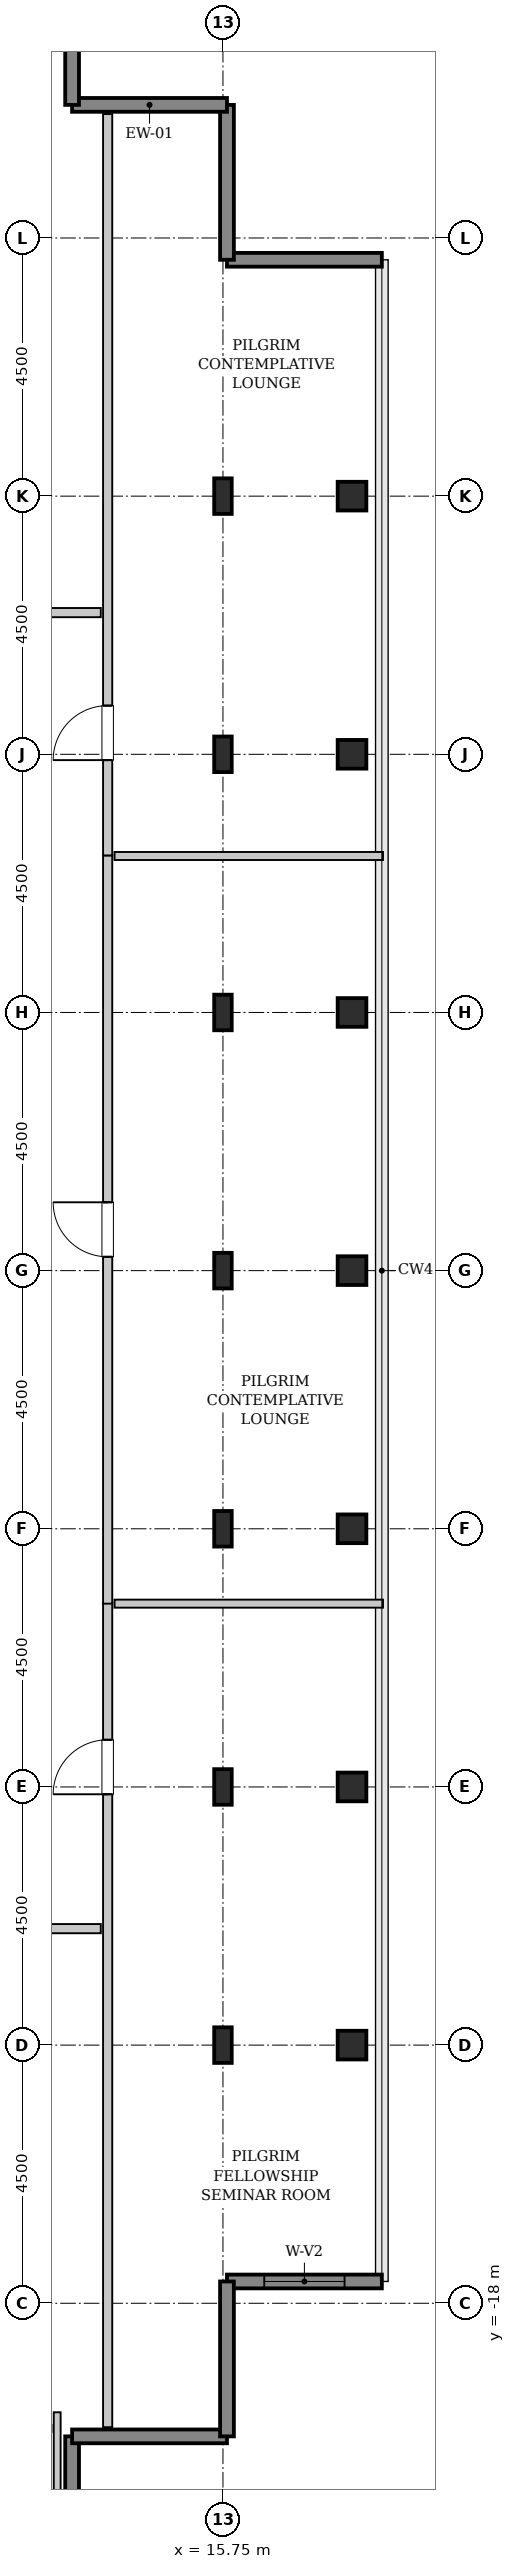
"""IFC4 building model, lengths in metres.
Left out: names, types, materials, properties, quantities, classifications, styles, units other than length and angle.
Written with IfcOpenShell. Run it as: python <this file> out.ifc"""

import sys

from ifc_helpers import new_model, si_unit, direction, frame, frame_2d, origin, origin_2d, place, context, subcontext, project, spatial, rectangle, hollow_rectangle, i_section, extrude, source, transform, mapped, element, fill, save


model = new_model("IFC4")
c1 = context("Model", 3, precision=1e-05, world=origin(), true_north=direction((0.0, 1.0)))
c2 = subcontext(c1, "Body", "Model", "MODEL_VIEW")
j1 = project(units=[si_unit("LENGTHUNIT", "METRE"), si_unit("PLANEANGLEUNIT", "RADIAN")], contexts=[c1])
p1 = place(None, origin())
s1 = spatial("IfcSite", under=j1, at=p1, CompositionType="ELEMENT")
p2 = place(p1, origin())
s2 = spatial("IfcBuilding", under=s1, at=p2, CompositionType="ELEMENT")
p3 = place(p2, frame((0.0, 0.0, 306.4)))
s3 = spatial("IfcBuildingStorey", under=s2, at=p3, CompositionType="ELEMENT", Elevation=306.4)
m1 = source(origin(), c2, "Body", "SweptSolid", [
    extrude(i_section(OverallWidth=0.305, OverallDepth=0.62, WebThickness=0.021, FlangeThickness=0.04, FilletRadius=0.027, at=origin_2d()), origin(), (0.0, 0.0, 1.0), 3.8),
])
for number, where, z_axis, x_axis in (
    (1, (15.75, -13.5, 0.0), (0.0, 0.0, 1.0), (1.0, 0.0, 0.0)),
    (2, (15.75, -9.0, 0.0), (0.0, 0.0, 1.0), (1.0, 0.0, 0.0)),
    (3, (15.75, -4.5, 0.0), (0.0, 0.0, 1.0), (1.0, 0.0, 0.0)),
    (4, (15.75, 0.0, 0.0), (0.0, 0.0, 1.0), (1.0, 0.0, 0.0)),
    (5, (15.75, 4.5, 0.0), (0.0, 0.0, 1.0), (1.0, 0.0, 0.0)),
    (6, (15.75, 9.0, 0.0), (0.0, 0.0, 1.0), (1.0, 0.0, 0.0)),
    (7, (15.75, 13.5, 0.0), (0.0, 0.0, 1.0), (1.0, 0.0, 0.0)),
):
    element("IfcColumn", number, at=place(p3, frame(where, z_axis=z_axis, x_axis=x_axis)), inside=s3, PredefinedType="COLUMN", context=c2, shape_type="MappedRepresentation", body=[
        mapped(m1, transform((0.0, 0.0, 0.0), x_axis=(1.0, 0.0, 0.0), y_axis=(0.0, 1.0, 0.0), z_axis=(0.0, 0.0, 1.0), scale=1.0)),
    ])
m2 = source(origin(), c2, "Body", "SweptSolid", [
    extrude(hollow_rectangle(XDim=0.5, YDim=0.5, WallThickness=0.025, InnerFilletRadius=0.025, OuterFilletRadius=0.05, at=origin_2d()), origin(), (0.0, 0.0, 1.0), 3.8),
])
for number, where, z_axis, x_axis in (
    (8, (18.0, -13.5, 0.0), (0.0, 0.0, 1.0), (1.0, 0.0, 0.0)),
    (9, (18.0, -9.0, 0.0), (0.0, 0.0, 1.0), (1.0, 0.0, 0.0)),
    (10, (18.0, -4.5, 0.0), (0.0, 0.0, 1.0), (1.0, 0.0, 0.0)),
    (11, (18.0, 0.0, 0.0), (0.0, 0.0, 1.0), (1.0, 0.0, 0.0)),
    (12, (18.0, 4.5, 0.0), (0.0, 0.0, 1.0), (1.0, 0.0, 0.0)),
    (13, (18.0, 9.0, 0.0), (0.0, 0.0, 1.0), (1.0, 0.0, 0.0)),
    (14, (18.0, 13.5, 0.0), (0.0, 0.0, 1.0), (1.0, 0.0, 0.0)),
):
    element("IfcColumn", number, at=place(p3, frame(where, z_axis=z_axis, x_axis=x_axis)), inside=s3, PredefinedType="COLUMN", context=c2, shape_type="MappedRepresentation", body=[
        mapped(m2, transform((0.0, 0.0, 0.0), x_axis=(1.0, 0.0, 0.0), y_axis=(0.0, 1.0, 0.0), z_axis=(0.0, 0.0, 1.0), scale=1.0)),
    ])
m3 = source(origin(), c2, "Body", "SweptSolid", [
    extrude(rectangle(XDim=2.7, YDim=0.24, at=frame_2d((1.35, 0.0))), origin(), (0.0, 0.0, 1.0), 3.55),
])
p4 = place(p3, frame((15.82, -17.62, 0.0), z_axis=(0.0, 0.0, 1.0), x_axis=(1.0, 0.0, 0.0)))
e15 = element("IfcWall", 15, at=p4, inside=s3, PredefinedType="SHEAR", context=c2, shape_type="MappedRepresentation", body=[
    mapped(m3, transform((0.0, 0.0, 0.0), x_axis=(1.0, 0.0, 0.0), y_axis=(0.0, 1.0, 0.0), z_axis=(0.0, 0.0, 1.0), scale=1.0)),
])
p5 = place(p4, frame((0.65, 0.0, 0.85)))
e16 = element("IfcOpeningElement", 16, at=p5, cuts=e15, PredefinedType="OPENING", context=c2, shape_type="SweptSolid", body=[
    extrude(rectangle(XDim=1.4, YDim=1.8, at=frame_2d((0.7, 0.9))), frame((0.0, 0.13, 0.0), z_axis=(0.0, -1.0, 0.0), x_axis=(1.0, 0.0, 0.0)), (0.0, 0.0, 1.0), 0.26),
])
for number, where, z_axis, x_axis in (
    (17, (18.52, 17.62, 0.0), (0.0, 0.0, 1.0), (-1.0, 0.0, 0.0)),
    (18, (15.82, 17.62, 0.0), (0.0, 0.0, 1.0), (0.0, 1.0, 0.0)),
    (19, (15.82, 20.32, 0.0), (0.0, 0.0, 1.0), (-1.0, 0.0, 0.0)),
    (20, (13.12, 20.32, 0.0), (0.0, 0.0, 1.0), (0.0, 1.0, 0.0)),
    (21, (13.12, -23.02, 0.0), (0.0, 0.0, 1.0), (0.0, 1.0, 0.0)),
    (22, (13.12, -20.32, 0.0), (0.0, 0.0, 1.0), (1.0, 0.0, 0.0)),
    (23, (15.82, -20.32, 0.0), (0.0, 0.0, 1.0), (0.0, 1.0, 0.0)),
):
    element("IfcWall", number, at=place(p3, frame(where, z_axis=z_axis, x_axis=x_axis)), inside=s3, PredefinedType="SHEAR", context=c2, shape_type="MappedRepresentation", body=[
        mapped(m3, transform((0.0, 0.0, 0.0), x_axis=(1.0, 0.0, 0.0), y_axis=(0.0, 1.0, 0.0), z_axis=(0.0, 0.0, 1.0), scale=1.0)),
    ])
m4 = source(origin(), c2, "Body", "SweptSolid", [
    extrude(rectangle(XDim=2.76, YDim=0.12, at=frame_2d((1.38, 0.0))), origin(), (0.0, 0.0, 1.0), 3.535),
])
p6 = place(p3, frame((12.86, -22.66, 0.0), z_axis=(0.0, 0.0, 1.0), x_axis=(0.0, 1.0, 0.0)))
e24 = element("IfcWall", 24, at=p6, inside=s3, PredefinedType="PLUMBINGWALL", context=c2, shape_type="MappedRepresentation", body=[
    mapped(m4, transform((0.0, 0.0, 0.0), x_axis=(1.0, 0.0, 0.0), y_axis=(0.0, 1.0, 0.0), z_axis=(0.0, 0.0, 1.0), scale=1.0)),
])
m5 = source(origin(), c2, "Body", "SweptSolid", [
    extrude(rectangle(XDim=14.365, YDim=0.16, at=frame_2d((7.183, 0.0))), origin(), (0.0, 0.0, 1.0), 3.535),
])
p7 = place(p3, frame((13.74, -20.16, 0.0), z_axis=(0.0, 0.0, 1.0), x_axis=(0.0, 1.0, 0.0)))
e25 = element("IfcWall", 25, at=p7, inside=s3, PredefinedType="PARTITIONING", context=c2, shape_type="MappedRepresentation", body=[
    mapped(m5, transform((0.0, 0.0, 0.0), x_axis=(1.0, 0.0, 0.0), y_axis=(0.0, 1.0, 0.0), z_axis=(0.0, 0.0, 1.0), scale=1.0)),
])
p8 = place(p7, frame((11.032, 0.0, 0.0)))
e26 = element("IfcOpeningElement", 26, at=p8, cuts=e25, PredefinedType="OPENING", context=c2, shape_type="SweptSolid", body=[
    extrude(rectangle(XDim=0.95, YDim=2.1, at=frame_2d((0.475, 1.05))), frame((0.0, 0.09, 0.0), z_axis=(0.0, -1.0, 0.0), x_axis=(1.0, 0.0, 0.0)), (0.0, 0.0, 1.0), 0.18),
])
m6 = source(origin(), c2, "Body", "SweptSolid", [
    extrude(rectangle(XDim=4.68, YDim=0.14, at=frame_2d((2.34, 0.0))), origin(), (0.0, 0.0, 1.0), 3.535),
])
p9 = place(p3, frame((13.86, -5.805, 0.0), z_axis=(0.0, 0.0, 1.0), x_axis=(1.0, 0.0, 0.0)))
e27 = element("IfcWall", 27, at=p9, inside=s3, PredefinedType="PARTITIONING", context=c2, shape_type="MappedRepresentation", body=[
    mapped(m6, transform((0.0, 0.0, 0.0), x_axis=(1.0, 0.0, 0.0), y_axis=(0.0, 1.0, 0.0), z_axis=(0.0, 0.0, 1.0), scale=1.0)),
])
m7 = source(origin(), c2, "Body", "SweptSolid", [
    extrude(rectangle(XDim=13.042, YDim=0.16, at=frame_2d((6.521, 0.0))), origin(), (0.0, 0.0, 1.0), 3.535),
])
p10 = place(p3, frame((13.74, -5.805, 0.0), z_axis=(0.0, 0.0, 1.0), x_axis=(0.0, 1.0, 0.0)))
e28 = element("IfcWall", 28, at=p10, inside=s3, PredefinedType="PARTITIONING", context=c2, shape_type="MappedRepresentation", body=[
    mapped(m7, transform((0.0, 0.0, 0.0), x_axis=(1.0, 0.0, 0.0), y_axis=(0.0, 1.0, 0.0), z_axis=(0.0, 0.0, 1.0), scale=1.0)),
])
p11 = place(p10, frame((6.046, 0.0, 0.0)))
e29 = element("IfcOpeningElement", 29, at=p11, cuts=e28, PredefinedType="OPENING", context=c2, shape_type="SweptSolid", body=[
    extrude(rectangle(XDim=0.95, YDim=2.1, at=frame_2d((0.475, 1.05))), frame((0.0, 0.09, 0.0), z_axis=(0.0, -1.0, 0.0), x_axis=(1.0, 0.0, 0.0)), (0.0, 0.0, 1.0), 0.18),
])
p12 = place(p3, frame((13.86, 7.228, 0.0), z_axis=(0.0, 0.0, 1.0), x_axis=(1.0, 0.0, 0.0)))
e30 = element("IfcWall", 30, at=p12, inside=s3, PredefinedType="PARTITIONING", context=c2, shape_type="MappedRepresentation", body=[
    mapped(m6, transform((0.0, 0.0, 0.0), x_axis=(1.0, 0.0, 0.0), y_axis=(0.0, 1.0, 0.0), z_axis=(0.0, 0.0, 1.0), scale=1.0)),
])
m8 = source(origin(), c2, "Body", "SweptSolid", [
    extrude(rectangle(XDim=12.922, YDim=0.16, at=frame_2d((6.461, 0.0))), origin(), (0.0, 0.0, 1.0), 3.535),
])
p13 = place(p3, frame((13.74, 7.238, 0.0), z_axis=(0.0, 0.0, 1.0), x_axis=(0.0, 1.0, 0.0)))
e31 = element("IfcWall", 31, at=p13, inside=s3, PredefinedType="PARTITIONING", context=c2, shape_type="MappedRepresentation", body=[
    mapped(m8, transform((0.0, 0.0, 0.0), x_axis=(1.0, 0.0, 0.0), y_axis=(0.0, 1.0, 0.0), z_axis=(0.0, 0.0, 1.0), scale=1.0)),
])
p14 = place(p13, frame((1.661, 0.0, 0.0)))
e32 = element("IfcOpeningElement", 32, at=p14, cuts=e31, PredefinedType="OPENING", context=c2, shape_type="SweptSolid", body=[
    extrude(rectangle(XDim=0.95, YDim=2.1, at=frame_2d((0.475, 1.05))), frame((0.0, 0.09, 0.0), z_axis=(0.0, -1.0, 0.0), x_axis=(1.0, 0.0, 0.0)), (0.0, 0.0, 1.0), 0.18),
])
m9 = source(origin(), c2, "Body", "SweptSolid", [
    extrude(rectangle(XDim=5.225, YDim=0.16, at=frame_2d((2.613, 0.0))), origin(), (0.0, 0.0, 1.0), 3.535),
])
p15 = place(p3, frame((8.395, 11.47, 0.0), z_axis=(0.0, 0.0, 1.0), x_axis=(1.0, 0.0, 0.0)))
e33 = element("IfcWall", 33, at=p15, inside=s3, PredefinedType="PARTITIONING", context=c2, shape_type="MappedRepresentation", body=[
    mapped(m9, transform((0.0, 0.0, 0.0), x_axis=(1.0, 0.0, 0.0), y_axis=(0.0, 1.0, 0.0), z_axis=(0.0, 0.0, 1.0), scale=1.0)),
])
p16 = place(p15, frame((2.137, 0.0, 0.0)))
e34 = element("IfcOpeningElement", 34, at=p16, cuts=e33, PredefinedType="OPENING", context=c2, shape_type="SweptSolid", body=[
    extrude(rectangle(XDim=0.95, YDim=2.1, at=frame_2d((0.475, 1.05))), frame((0.0, 0.09, 0.0), z_axis=(0.0, -1.0, 0.0), x_axis=(1.0, 0.0, 0.0)), (0.0, 0.0, 1.0), 0.18),
])
m10 = source(origin(), c2, "Body", "SweptSolid", [
    extrude(rectangle(XDim=3.56, YDim=0.16, at=frame_2d((1.78, 0.0))), origin(), (0.0, 0.0, 1.0), 3.535),
])
p17 = place(p3, frame((10.06, -11.47, 0.0), z_axis=(0.0, 0.0, 1.0), x_axis=(1.0, 0.0, 0.0)))
e35 = element("IfcWall", 35, at=p17, inside=s3, PredefinedType="PARTITIONING", context=c2, shape_type="MappedRepresentation", body=[
    mapped(m10, transform((0.0, 0.0, 0.0), x_axis=(1.0, 0.0, 0.0), y_axis=(0.0, 1.0, 0.0), z_axis=(0.0, 0.0, 1.0), scale=1.0)),
])
p18 = place(p17, frame((1.305, 0.0, 0.0)))
e36 = element("IfcOpeningElement", 36, at=p18, cuts=e35, PredefinedType="OPENING", context=c2, shape_type="SweptSolid", body=[
    extrude(rectangle(XDim=0.95, YDim=2.1, at=frame_2d((0.475, 1.05))), frame((0.0, 0.09, 0.0), z_axis=(0.0, -1.0, 0.0), x_axis=(1.0, 0.0, 0.0)), (0.0, 0.0, 1.0), 0.18),
])
m11 = source(origin(), c2, "Body", "SweptSolid", [
    extrude(rectangle(XDim=1.4, YDim=1.8, at=frame_2d((0.7, 0.9))), frame((0.0, 0.03, 0.0), z_axis=(0.0, -1.0, 0.0), x_axis=(1.0, 0.0, 0.0)), (0.0, 0.0, 1.0), 0.06),
])
p19 = place(p5, origin())
e37 = element("IfcWindow", 37, at=p19, inside=s3, PartitioningType="SINGLE_PANEL", PredefinedType="WINDOW", context=c2, shape_type="MappedRepresentation", body=[
    mapped(m11, transform((0.0, 0.0, 0.0), x_axis=(1.0, 0.0, 0.0), y_axis=(0.0, 1.0, 0.0), z_axis=(0.0, 0.0, 1.0), scale=1.0)),
])
fill(e16, e37)
m12 = source(origin(), c2, "Body", "SweptSolid", [
    extrude(rectangle(XDim=0.95, YDim=2.1, at=frame_2d((0.475, 1.05))), frame((0.0, 0.025, 0.0), z_axis=(0.0, -1.0, 0.0), x_axis=(1.0, 0.0, 0.0)), (0.0, 0.0, 1.0), 0.05),
])
p20 = place(p8, origin())
e38 = element("IfcDoor", 38, at=p20, inside=s3, OperationType="SINGLE_SWING_LEFT", PredefinedType="DOOR", context=c2, shape_type="MappedRepresentation", body=[
    mapped(m12, transform((0.0, 0.0, 0.0), x_axis=(1.0, 0.0, 0.0), y_axis=(0.0, 1.0, 0.0), z_axis=(0.0, 0.0, 1.0), scale=1.0)),
])
fill(e26, e38)
p21 = place(p11, origin())
e39 = element("IfcDoor", 39, at=p21, inside=s3, OperationType="SINGLE_SWING_RIGHT", PredefinedType="DOOR", context=c2, shape_type="MappedRepresentation", body=[
    mapped(m12, transform((0.0, 0.0, 0.0), x_axis=(1.0, 0.0, 0.0), y_axis=(0.0, 1.0, 0.0), z_axis=(0.0, 0.0, 1.0), scale=1.0)),
])
fill(e29, e39)
p22 = place(p14, origin())
e40 = element("IfcDoor", 40, at=p22, inside=s3, OperationType="SINGLE_SWING_LEFT", PredefinedType="DOOR", context=c2, shape_type="MappedRepresentation", body=[
    mapped(m12, transform((0.0, 0.0, 0.0), x_axis=(1.0, 0.0, 0.0), y_axis=(0.0, 1.0, 0.0), z_axis=(0.0, 0.0, 1.0), scale=1.0)),
])
fill(e32, e40)
save(model, sys.argv[1])
